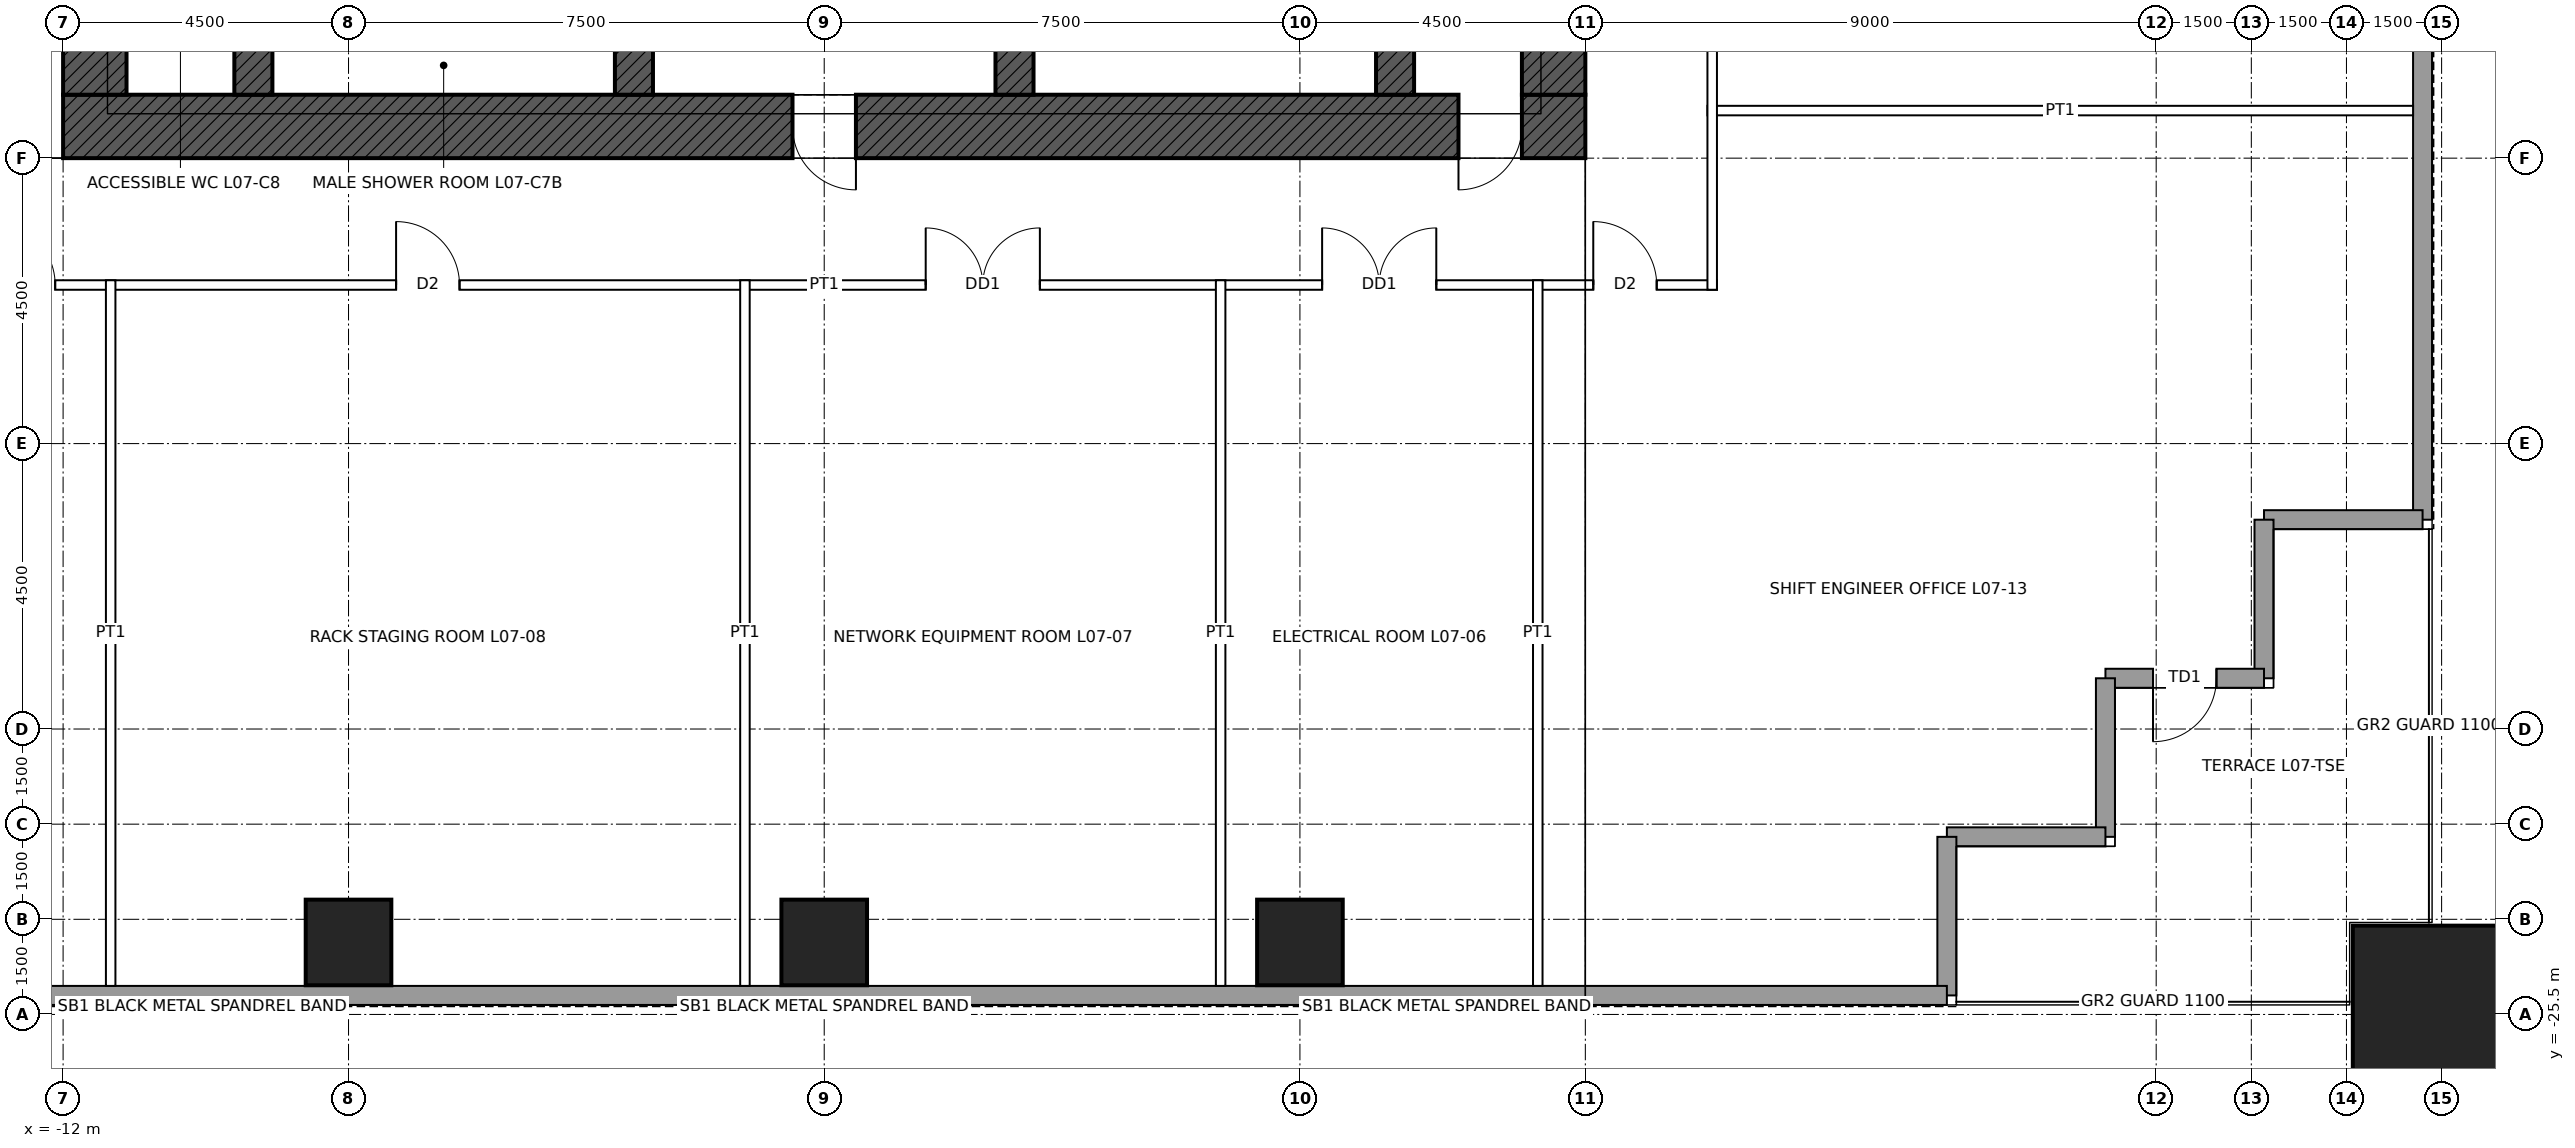
"""IFC4 building model, lengths in metres.
Left out: names, types, materials, properties, quantities, classifications, styles, units other than length and angle.
Written with IfcOpenShell. Run it as: python <this file> out.ifc"""

import sys

from ifc_helpers import new_model, si_unit, direction, frame, frame_2d, origin, origin_2d, place, context, subcontext, project, spatial, rectangle, hollow_rectangle, extrude, element, fill, save


model = new_model("IFC4")
c1 = context("Model", 3, precision=1e-05, world=origin(), true_north=direction((0.0, 1.0)))
c2 = subcontext(c1, "Body", "Model", "MODEL_VIEW")
j1 = project(units=[si_unit("LENGTHUNIT", "METRE"), si_unit("PLANEANGLEUNIT", "RADIAN")], contexts=[c1])
p1 = place(None, origin())
s1 = spatial("IfcSite", under=j1, at=p1, CompositionType="ELEMENT")
p2 = place(p1, origin())
s2 = spatial("IfcBuilding", under=s1, at=p2, CompositionType="ELEMENT")
p3 = place(p2, frame((0.0, 0.0, 38.4)))
s3 = spatial("IfcBuildingStorey", under=s2, at=p3, CompositionType="ELEMENT", Elevation=38.4)
p4 = place(p3, frame((25.5, -25.5, 0.0), z_axis=(0.0, 0.0, 1.0), x_axis=(1.0, 0.0, 0.0)))
e1 = element("IfcColumn", 1, at=p4, inside=s3, PredefinedType="COLUMN", context=c2, shape_type="SweptSolid", body=[
    extrude(hollow_rectangle(XDim=2.8, YDim=2.8, WallThickness=0.14, at=origin_2d()), origin(), (0.0, 0.0, 1.0), 5.0),
])
for number, where, z_axis, x_axis in (
    (2, (7.5, -24.365, 0.0), (0.0, 0.0, 1.0), (1.0, 0.0, 0.0)),
    (3, (0.0, -24.365, 0.0), (0.0, 0.0, 1.0), (1.0, 0.0, 0.0)),
    (4, (-7.5, -24.365, 0.0), (0.0, 0.0, 1.0), (1.0, 0.0, 0.0)),
):
    element("IfcColumn", number, at=place(p3, frame(where, z_axis=z_axis, x_axis=x_axis)), inside=s3, PredefinedType="COLUMN", context=c2, shape_type="SweptSolid", body=[
        extrude(hollow_rectangle(XDim=1.35, YDim=1.35, WallThickness=0.085, at=origin_2d()), origin(), (0.0, 0.0, 1.0), 5.0),
    ])
p5 = place(p3, frame((12.0, -11.5, 0.0), z_axis=(0.0, 0.0, 1.0), x_axis=(-1.0, 0.0, 0.0)))
e5 = element("IfcWall", 5, at=p5, inside=s3, PredefinedType="SHEAR", context=c2, shape_type="SweptSolid", body=[
    extrude(rectangle(XDim=24.0, YDim=1.0, at=frame_2d((12.0, 0.0))), origin(), (0.0, 0.0, 1.0), 5.0),
])
p6 = place(p5, frame((11.5, 0.0, 0.0)))
e6 = element("IfcOpeningElement", 6, at=p6, cuts=e5, PredefinedType="OPENING", context=c2, shape_type="SweptSolid", body=[
    extrude(rectangle(XDim=1.0, YDim=2.1, at=frame_2d((0.5, 1.05))), frame((0.0, 0.51, 0.0), z_axis=(0.0, -1.0, 0.0), x_axis=(1.0, 0.0, 0.0)), (0.0, 0.0, 1.0), 1.02),
])
p7 = place(p5, frame((1.0, 0.0, 0.0)))
e7 = element("IfcOpeningElement", 7, at=p7, cuts=e5, PredefinedType="OPENING", context=c2, shape_type="SweptSolid", body=[
    extrude(rectangle(XDim=1.0, YDim=2.4, at=frame_2d((0.5, 1.2))), frame((0.0, 0.51, 0.0), z_axis=(0.0, -1.0, 0.0), x_axis=(1.0, 0.0, 0.0)), (0.0, 0.0, 1.0), 1.02),
])
p8 = place(p3, frame((11.5, 11.0, 0.0), z_axis=(0.0, 0.0, 1.0), x_axis=(0.0, -1.0, 0.0)))
e8 = element("IfcWall", 8, at=p8, inside=s3, PredefinedType="SHEAR", context=c2, shape_type="SweptSolid", body=[
    extrude(rectangle(XDim=22.0, YDim=1.0, at=frame_2d((11.0, 0.0))), origin(), (0.0, 0.0, 1.0), 5.0),
])
p9 = place(p8, frame((10.5, 0.0, 0.0)))
e9 = element("IfcOpeningElement", 9, at=p9, cuts=e8, PredefinedType="OPENING", context=c2, shape_type="SweptSolid", body=[
    extrude(rectangle(XDim=1.0, YDim=2.4, at=frame_2d((0.5, 1.2))), frame((0.0, 0.51, 0.0), z_axis=(0.0, -1.0, 0.0), x_axis=(1.0, 0.0, 0.0)), (0.0, 0.0, 1.0), 1.02),
])
p10 = place(p3, frame((-11.5, -11.0, 0.0), z_axis=(0.0, 0.0, 1.0), x_axis=(0.0, 1.0, 0.0)))
e10 = element("IfcWall", 10, at=p10, inside=s3, PredefinedType="SHEAR", context=c2, shape_type="SweptSolid", body=[
    extrude(rectangle(XDim=22.0, YDim=1.0, at=frame_2d((11.0, 0.0))), origin(), (0.0, 0.0, 1.0), 5.0),
])
p11 = place(p10, frame((10.5, 0.0, 0.0)))
e11 = element("IfcOpeningElement", 11, at=p11, cuts=e10, PredefinedType="OPENING", context=c2, shape_type="SweptSolid", body=[
    extrude(rectangle(XDim=1.0, YDim=2.4, at=frame_2d((0.5, 1.2))), frame((0.0, 0.51, 0.0), z_axis=(0.0, -1.0, 0.0), x_axis=(1.0, 0.0, 0.0)), (0.0, 0.0, 1.0), 1.02),
])
p12 = place(p3, frame((-9.0, -11.0, 0.0), z_axis=(0.0, 0.0, 1.0), x_axis=(0.0, 1.0, 0.0)))
e12 = element("IfcWall", 12, at=p12, inside=s3, PredefinedType="SHEAR", context=c2, shape_type="SweptSolid", body=[
    extrude(rectangle(XDim=6.5, YDim=0.6, at=frame_2d((3.25, 0.0))), origin(), (0.0, 0.0, 1.0), 5.0),
])
p13 = place(p12, frame((4.25, 0.0, 0.0)))
e13 = element("IfcOpeningElement", 13, at=p13, cuts=e12, PredefinedType="OPENING", context=c2, shape_type="SweptSolid", body=[
    extrude(rectangle(XDim=1.0, YDim=2.1, at=frame_2d((0.5, 1.05))), frame((0.0, 0.31, 0.0), z_axis=(0.0, -1.0, 0.0), x_axis=(1.0, 0.0, 0.0)), (0.0, 0.0, 1.0), 0.62),
])
p14 = place(p3, frame((9.0, -11.0, 0.0), z_axis=(0.0, 0.0, 1.0), x_axis=(0.0, 1.0, 0.0)))
e14 = element("IfcWall", 14, at=p14, inside=s3, PredefinedType="SHEAR", context=c2, shape_type="SweptSolid", body=[
    extrude(rectangle(XDim=6.5, YDim=0.6, at=frame_2d((3.25, 0.0))), origin(), (0.0, 0.0, 1.0), 5.0),
])
p15 = place(p14, frame((4.25, 0.0, 0.0)))
e15 = element("IfcOpeningElement", 15, at=p15, cuts=e14, PredefinedType="OPENING", context=c2, shape_type="SweptSolid", body=[
    extrude(rectangle(XDim=1.0, YDim=2.1, at=frame_2d((0.5, 1.05))), frame((0.0, 0.31, 0.0), z_axis=(0.0, -1.0, 0.0), x_axis=(1.0, 0.0, 0.0)), (0.0, 0.0, 1.0), 0.62),
])
for number, where, z_axis, x_axis in (
    (16, (-3.0, -11.0, 0.0), (0.0, 0.0, 1.0), (0.0, 1.0, 0.0)),
    (17, (3.0, -11.0, 0.0), (0.0, 0.0, 1.0), (0.0, 1.0, 0.0)),
):
    element("IfcWall", number, at=place(p3, frame(where, z_axis=z_axis, x_axis=x_axis)), inside=s3, PredefinedType="SHEAR", context=c2, shape_type="SweptSolid", body=[
        extrude(rectangle(XDim=6.5, YDim=0.6, at=frame_2d((3.25, 0.0))), origin(), (0.0, 0.0, 1.0), 5.0),
    ])
p16 = place(p3, frame((25.2, 17.7, 0.0), z_axis=(0.0, 0.0, 1.0), x_axis=(0.0, -1.0, 0.0)))
e18 = element("IfcWall", 18, at=p16, inside=s3, PredefinedType="SOLIDWALL", context=c2, shape_type="SweptSolid", body=[
    extrude(rectangle(XDim=35.4, YDim=0.3, at=frame_2d((17.7, 0.0))), origin(), (0.0, 0.0, 1.0), 4.8),
])
for number, where, z_axis, x_axis in (
    (19, (25.2, -17.7, 0.0), (0.0, 0.0, 1.0), (-1.0, 0.0, 0.0)),
    (20, (22.7, -17.7, 0.0), (0.0, 0.0, 1.0), (0.0, -1.0, 0.0)),
):
    element("IfcWall", number, at=place(p3, frame(where, z_axis=z_axis, x_axis=x_axis)), inside=s3, PredefinedType="SOLIDWALL", context=c2, shape_type="SweptSolid", body=[
        extrude(rectangle(XDim=2.5, YDim=0.3, at=frame_2d((1.25, 0.0))), origin(), (0.0, 0.0, 1.0), 4.8),
    ])
p17 = place(p3, frame((22.7, -20.2, 0.0), z_axis=(0.0, 0.0, 1.0), x_axis=(-1.0, 0.0, 0.0)))
e21 = element("IfcWall", 21, at=p17, inside=s3, PredefinedType="SOLIDWALL", context=c2, shape_type="SweptSolid", body=[
    extrude(rectangle(XDim=2.5, YDim=0.3, at=frame_2d((1.25, 0.0))), origin(), (0.0, 0.0, 1.0), 4.8),
])
p18 = place(p17, frame((0.75, 0.0, 0.0)))
e22 = element("IfcOpeningElement", 22, at=p18, cuts=e21, PredefinedType="OPENING", context=c2, shape_type="SweptSolid", body=[
    extrude(rectangle(XDim=1.0, YDim=2.4, at=frame_2d((0.5, 1.2))), frame((0.0, 0.16, 0.0), z_axis=(0.0, -1.0, 0.0), x_axis=(1.0, 0.0, 0.0)), (0.0, 0.0, 1.0), 0.32),
])
for number, where, z_axis, x_axis in (
    (23, (20.2, -20.2, 0.0), (0.0, 0.0, 1.0), (0.0, -1.0, 0.0)),
    (24, (20.2, -22.7, 0.0), (0.0, 0.0, 1.0), (-1.0, 0.0, 0.0)),
    (25, (17.7, -22.7, 0.0), (0.0, 0.0, 1.0), (0.0, -1.0, 0.0)),
):
    element("IfcWall", number, at=place(p3, frame(where, z_axis=z_axis, x_axis=x_axis)), inside=s3, PredefinedType="SOLIDWALL", context=c2, shape_type="SweptSolid", body=[
        extrude(rectangle(XDim=2.5, YDim=0.3, at=frame_2d((1.25, 0.0))), origin(), (0.0, 0.0, 1.0), 4.8),
    ])
p19 = place(p3, frame((17.7, -25.2, 0.0), z_axis=(0.0, 0.0, 1.0), x_axis=(-1.0, 0.0, 0.0)))
e26 = element("IfcWall", 26, at=p19, inside=s3, PredefinedType="SOLIDWALL", context=c2, shape_type="SweptSolid", body=[
    extrude(rectangle(XDim=35.4, YDim=0.3, at=frame_2d((17.7, 0.0))), origin(), (0.0, 0.0, 1.0), 4.8),
])
p20 = place(p3, frame((-14.075, -14.0, 0.0), z_axis=(0.0, 0.0, 1.0), x_axis=(1.0, 0.0, 0.0)))
e27 = element("IfcWall", 27, at=p20, inside=s3, PredefinedType="PARTITIONING", context=c2, shape_type="SweptSolid", body=[
    extrude(rectangle(XDim=28.15, YDim=0.15, at=frame_2d((14.075, 0.0))), origin(), (0.0, 0.0, 1.0), 4.8),
])
p21 = place(p20, frame((21.925, 0.0, 0.0)))
e28 = element("IfcOpeningElement", 28, at=p21, cuts=e27, PredefinedType="OPENING", context=c2, shape_type="SweptSolid", body=[
    extrude(rectangle(XDim=1.8, YDim=2.4, at=frame_2d((0.9, 1.2))), frame((0.0, 0.085, 0.0), z_axis=(0.0, -1.0, 0.0), x_axis=(1.0, 0.0, 0.0)), (0.0, 0.0, 1.0), 0.17),
])
p22 = place(p20, frame((15.675, 0.0, 0.0)))
e29 = element("IfcOpeningElement", 29, at=p22, cuts=e27, PredefinedType="OPENING", context=c2, shape_type="SweptSolid", body=[
    extrude(rectangle(XDim=1.8, YDim=2.4, at=frame_2d((0.9, 1.2))), frame((0.0, 0.085, 0.0), z_axis=(0.0, -1.0, 0.0), x_axis=(1.0, 0.0, 0.0)), (0.0, 0.0, 1.0), 0.17),
])
p23 = place(p20, frame((7.325, 0.0, 0.0)))
e30 = element("IfcOpeningElement", 30, at=p23, cuts=e27, PredefinedType="OPENING", context=c2, shape_type="SweptSolid", body=[
    extrude(rectangle(XDim=1.0, YDim=2.1, at=frame_2d((0.5, 1.05))), frame((0.0, 0.085, 0.0), z_axis=(0.0, -1.0, 0.0), x_axis=(1.0, 0.0, 0.0)), (0.0, 0.0, 1.0), 0.17),
])
p24 = place(p20, frame((26.2, 0.0, 0.0)))
e31 = element("IfcOpeningElement", 31, at=p24, cuts=e27, PredefinedType="OPENING", context=c2, shape_type="SweptSolid", body=[
    extrude(rectangle(XDim=1.0, YDim=2.1, at=frame_2d((0.5, 1.05))), frame((0.0, 0.085, 0.0), z_axis=(0.0, -1.0, 0.0), x_axis=(1.0, 0.0, 0.0)), (0.0, 0.0, 1.0), 0.17),
])
p25 = place(p20, frame((0.95, 0.0, 0.0)))
e32 = element("IfcOpeningElement", 32, at=p25, cuts=e27, PredefinedType="OPENING", context=c2, shape_type="SweptSolid", body=[
    extrude(rectangle(XDim=1.0, YDim=2.1, at=frame_2d((0.5, 1.05))), frame((0.0, 0.085, 0.0), z_axis=(0.0, -1.0, 0.0), x_axis=(1.0, 0.0, 0.0)), (0.0, 0.0, 1.0), 0.17),
])
for number, where, z_axis, x_axis in (
    (33, (13.925, -11.25, 0.0), (0.0, 0.0, 1.0), (1.0, 0.0, 0.0)),
    (34, (-11.25, -25.05, 0.0), (0.0, 0.0, 1.0), (0.0, 1.0, 0.0)),
):
    element("IfcWall", number, at=place(p3, frame(where, z_axis=z_axis, x_axis=x_axis)), inside=s3, PredefinedType="PARTITIONING", context=c2, shape_type="SweptSolid", body=[
        extrude(rectangle(XDim=11.125, YDim=0.15, at=frame_2d((5.562, 0.0))), origin(), (0.0, 0.0, 1.0), 3.853),
    ])
for number, where, z_axis, x_axis in (
    (35, (-1.25, -25.05, 0.0), (0.0, 0.0, 1.0), (0.0, 1.0, 0.0)),
    (36, (6.25, -25.05, 0.0), (0.0, 0.0, 1.0), (0.0, 1.0, 0.0)),
):
    element("IfcWall", number, at=place(p3, frame(where, z_axis=z_axis, x_axis=x_axis)), inside=s3, PredefinedType="PARTITIONING", context=c2, shape_type="SweptSolid", body=[
        extrude(rectangle(XDim=11.125, YDim=0.15, at=frame_2d((5.562, 0.0))), origin(), (0.0, 0.0, 1.0), 4.8),
    ])
p26 = place(p3, frame((11.25, -25.05, 0.0), z_axis=(0.0, 0.0, 1.0), x_axis=(0.0, 1.0, 0.0)))
e37 = element("IfcWall", 37, at=p26, inside=s3, PredefinedType="PARTITIONING", context=c2, shape_type="SweptSolid", body=[
    extrude(rectangle(XDim=11.125, YDim=0.15, at=frame_2d((5.562, 0.0))), origin(), (0.0, 0.0, 1.0), 3.853),
])
p27 = place(p3, frame((14.0, -14.075, 0.0), z_axis=(0.0, 0.0, 1.0), x_axis=(0.0, 1.0, 0.0)))
e38 = element("IfcWall", 38, at=p27, inside=s3, PredefinedType="PARTITIONING", context=c2, shape_type="SweptSolid", body=[
    extrude(rectangle(XDim=28.15, YDim=0.15, at=frame_2d((14.075, 0.0))), origin(), (0.0, 0.0, 1.0), 4.8),
])
p28 = place(p27, frame((20.45, 0.0, 0.0)))
e39 = element("IfcOpeningElement", 39, at=p28, cuts=e38, PredefinedType="OPENING", context=c2, shape_type="SweptSolid", body=[
    extrude(rectangle(XDim=1.0, YDim=2.1, at=frame_2d((0.5, 1.05))), frame((0.0, 0.085, 0.0), z_axis=(0.0, -1.0, 0.0), x_axis=(1.0, 0.0, 0.0)), (0.0, 0.0, 1.0), 0.17),
])
p29 = place(p27, frame((8.8, 0.0, 0.0)))
e40 = element("IfcOpeningElement", 40, at=p29, cuts=e38, PredefinedType="OPENING", context=c2, shape_type="SweptSolid", body=[
    extrude(rectangle(XDim=1.8, YDim=2.4, at=frame_2d((0.9, 1.2))), frame((0.0, 0.085, 0.0), z_axis=(0.0, -1.0, 0.0), x_axis=(1.0, 0.0, 0.0)), (0.0, 0.0, 1.0), 0.17),
])
p30 = place(p18, origin())
e41 = element("IfcDoor", 41, at=p30, inside=s3, OperationType="SINGLE_SWING_RIGHT", PredefinedType="DOOR", context=c2, shape_type="SweptSolid", body=[
    extrude(rectangle(XDim=1.0, YDim=2.4, at=frame_2d((0.5, 1.2))), frame((0.0, 0.025, 0.0), z_axis=(0.0, -1.0, 0.0), x_axis=(1.0, 0.0, 0.0)), (0.0, 0.0, 1.0), 0.05),
])
fill(e22, e41)
p31 = place(p6, origin())
e42 = element("IfcDoor", 42, at=p31, inside=s3, OperationType="SINGLE_SWING_LEFT", PredefinedType="DOOR", context=c2, shape_type="SweptSolid", body=[
    extrude(rectangle(XDim=1.0, YDim=2.1, at=frame_2d((0.5, 1.05))), frame((0.0, 0.485, 0.0), z_axis=(0.0, -1.0, 0.0), x_axis=(1.0, 0.0, 0.0)), (0.0, 0.0, 1.0), 0.05),
])
fill(e6, e42)
p32 = place(p7, origin())
e43 = element("IfcDoor", 43, at=p32, inside=s3, OperationType="SINGLE_SWING_RIGHT", PredefinedType="DOOR", context=c2, shape_type="SweptSolid", body=[
    extrude(rectangle(XDim=1.0, YDim=2.4, at=frame_2d((0.5, 1.2))), frame((0.0, 0.485, 0.0), z_axis=(0.0, -1.0, 0.0), x_axis=(1.0, 0.0, 0.0)), (0.0, 0.0, 1.0), 0.05),
])
fill(e7, e43)
p33 = place(p21, origin())
e44 = element("IfcDoor", 44, at=p33, inside=s3, OperationType="DOUBLE_DOOR_SINGLE_SWING", PredefinedType="DOOR", context=c2, shape_type="SweptSolid", body=[
    extrude(rectangle(XDim=1.8, YDim=2.4, at=frame_2d((0.9, 1.2))), frame((0.0, 0.025, 0.0), z_axis=(0.0, -1.0, 0.0), x_axis=(1.0, 0.0, 0.0)), (0.0, 0.0, 1.0), 0.05),
])
fill(e28, e44)
p34 = place(p22, origin())
e45 = element("IfcDoor", 45, at=p34, inside=s3, OperationType="DOUBLE_DOOR_SINGLE_SWING", PredefinedType="DOOR", context=c2, shape_type="SweptSolid", body=[
    extrude(rectangle(XDim=1.8, YDim=2.4, at=frame_2d((0.9, 1.2))), frame((0.0, 0.025, 0.0), z_axis=(0.0, -1.0, 0.0), x_axis=(1.0, 0.0, 0.0)), (0.0, 0.0, 1.0), 0.05),
])
fill(e29, e45)
p35 = place(p23, origin())
e46 = element("IfcDoor", 46, at=p35, inside=s3, OperationType="SINGLE_SWING_LEFT", PredefinedType="DOOR", context=c2, shape_type="SweptSolid", body=[
    extrude(rectangle(XDim=1.0, YDim=2.1, at=frame_2d((0.5, 1.05))), frame((0.0, 0.025, 0.0), z_axis=(0.0, -1.0, 0.0), x_axis=(1.0, 0.0, 0.0)), (0.0, 0.0, 1.0), 0.05),
])
fill(e30, e46)
p36 = place(p24, origin())
e47 = element("IfcDoor", 47, at=p36, inside=s3, OperationType="SINGLE_SWING_LEFT", PredefinedType="DOOR", context=c2, shape_type="SweptSolid", body=[
    extrude(rectangle(XDim=1.0, YDim=2.1, at=frame_2d((0.5, 1.05))), frame((0.0, 0.025, 0.0), z_axis=(0.0, -1.0, 0.0), x_axis=(1.0, 0.0, 0.0)), (0.0, 0.0, 1.0), 0.05),
])
fill(e31, e47)
p37 = place(p25, origin())
e48 = element("IfcDoor", 48, at=p37, inside=s3, OperationType="SINGLE_SWING_LEFT", PredefinedType="DOOR", context=c2, shape_type="SweptSolid", body=[
    extrude(rectangle(XDim=1.0, YDim=2.1, at=frame_2d((0.5, 1.05))), frame((0.0, 0.025, 0.0), z_axis=(0.0, -1.0, 0.0), x_axis=(1.0, 0.0, 0.0)), (0.0, 0.0, 1.0), 0.05),
])
fill(e32, e48)
save(model, sys.argv[1])
